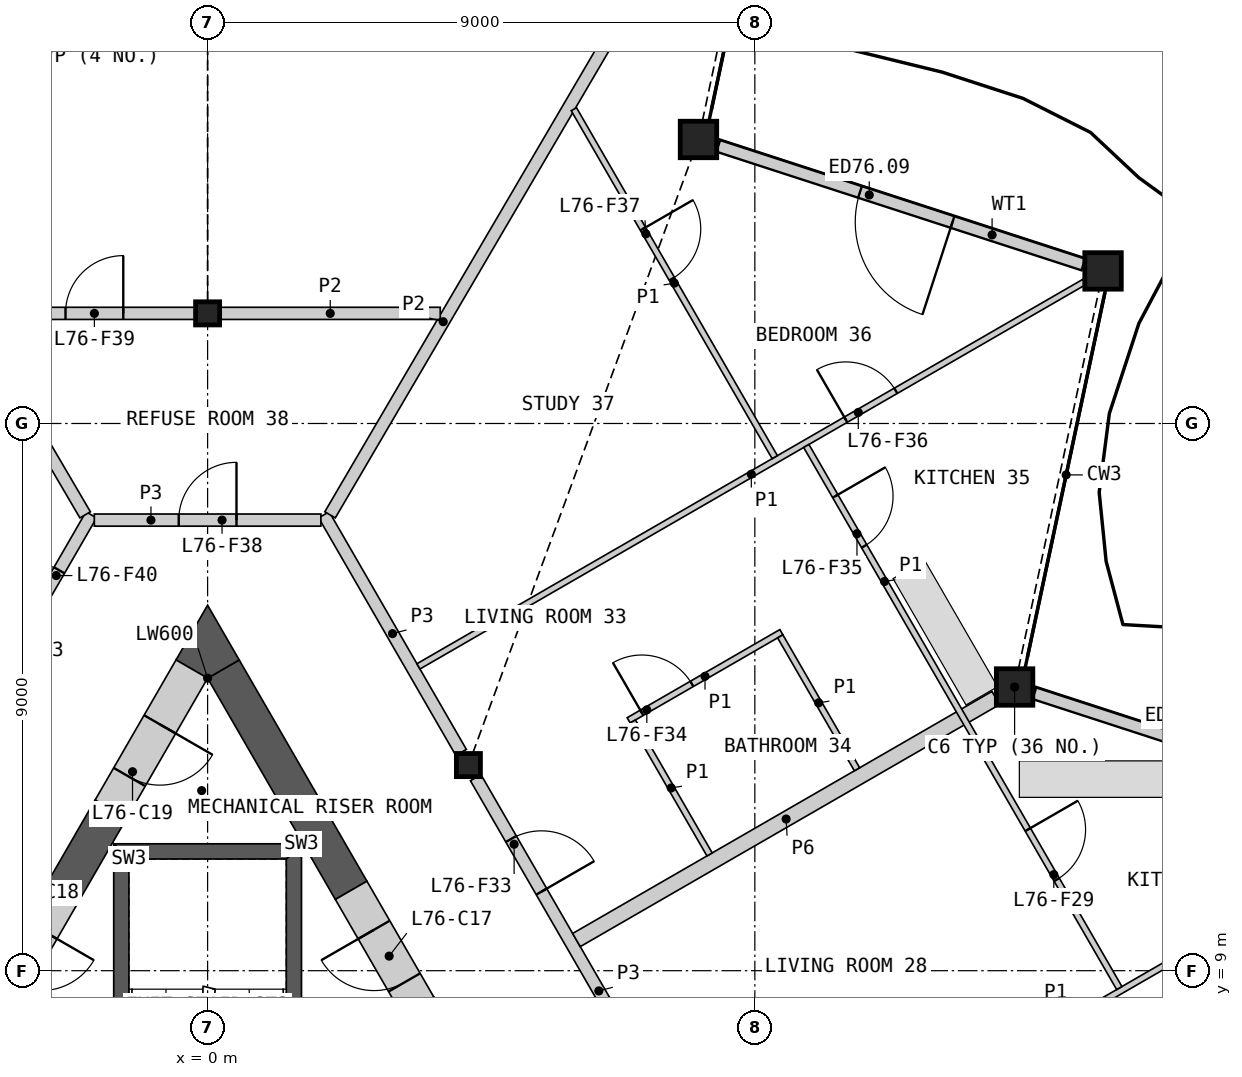
"""IFC4 building model, lengths in metres.
Left out: names, types, materials, properties, quantities, classifications, styles, units other than length and angle.
Written with IfcOpenShell. Run it as: python <this file> out.ifc"""

import sys

from ifc_helpers import new_model, si_unit, direction, frame, frame_2d, origin, origin_2d, place, context, subcontext, project, spatial, polyline, rectangle, hollow_rectangle, i_section, outline, extrude, element, fill, save


model = new_model("IFC4")
c1 = context("Model", 3, precision=1e-05, world=origin(), true_north=direction((0.0, 1.0)))
c2 = subcontext(c1, "Body", "Model", "MODEL_VIEW")
j1 = project(units=[si_unit("LENGTHUNIT", "METRE"), si_unit("PLANEANGLEUNIT", "RADIAN")], contexts=[c1])
p1 = place(None, origin())
s1 = spatial("IfcSite", under=j1, at=p1, CompositionType="ELEMENT")
p2 = place(p1, origin())
s2 = spatial("IfcBuilding", under=s1, at=p2, CompositionType="ELEMENT")
p3 = place(p2, frame((0.0, 0.0, 339.2)))
s3 = spatial("IfcBuildingStorey", under=s2, at=p3, CompositionType="ELEMENT", Elevation=339.2)
for number, where, z_axis, x_axis in (
    (1, (13.272, 13.666, 0.0), (0.0, 0.0, 1.0), (1.0, 0.0, 0.0)),
    (2, (14.727, 20.509, 0.0), (0.0, 0.0, 1.0), (1.0, 0.0, 0.0)),
    (3, (8.073, 22.671, 0.0), (0.0, 0.0, 1.0), (1.0, 0.0, 0.0)),
):
    element("IfcColumn", number, at=place(p3, frame(where, z_axis=z_axis, x_axis=x_axis)), inside=s3, PredefinedType="COLUMN", context=c2, shape_type="SweptSolid", body=[
        extrude(hollow_rectangle(XDim=0.6, YDim=0.6, WallThickness=0.04, at=origin_2d()), origin(), (0.0, 0.0, 1.0), 3.4),
    ])
for number, where, z_axis, x_axis in (
    (4, (0.0, 19.811, 0.0), (0.0, 0.0, 1.0), (1.0, 0.0, 0.0)),
    (5, (4.289, 12.382, 0.0), (0.0, 0.0, 1.0), (1.0, 0.0, 0.0)),
):
    element("IfcColumn", number, at=place(p3, frame(where, z_axis=z_axis, x_axis=x_axis)), inside=s3, PredefinedType="COLUMN", context=c2, shape_type="SweptSolid", body=[
        extrude(i_section(OverallWidth=0.396, OverallDepth=0.381, WebThickness=0.019, FlangeThickness=0.03, at=origin_2d()), origin(), (0.0, 0.0, 1.0), 3.4),
    ])
p4 = place(p3, frame((19.601, 11.612, 0.0), z_axis=(0.0, 0.0, 1.0), x_axis=(-0.951065041052, 0.308990756638, 0.0)))
e6 = element("IfcWall", 6, at=p4, inside=s3, PredefinedType="SOLIDWALL", context=c2, shape_type="SweptSolid", body=[
    extrude(rectangle(XDim=6.313, YDim=0.2, at=frame_2d((3.156, 0.0))), origin(), (0.0, 0.0, 1.0), 2.488),
])
p5 = place(p4, frame((2.263, 0.0, 0.0)))
e7 = element("IfcOpeningElement", 7, at=p5, cuts=e6, PredefinedType="OPENING", context=c2, shape_type="SweptSolid", body=[
    extrude(rectangle(XDim=1.6, YDim=2.25, at=frame_2d((0.8, 1.125))), frame((0.0, 0.11, 0.0), z_axis=(0.0, -1.0, 0.0), x_axis=(1.0, 0.0, 0.0)), (0.0, 0.0, 1.0), 0.22),
])
p6 = place(p3, frame((14.403, 20.614, 0.0), z_axis=(0.0, 0.0, 1.0), x_axis=(-0.951053103012, 0.309027499182, 0.0)))
e8 = element("IfcWall", 8, at=p6, inside=s3, PredefinedType="SOLIDWALL", context=c2, shape_type="SweptSolid", body=[
    extrude(rectangle(XDim=6.315, YDim=0.2, at=frame_2d((3.157, 0.0))), origin(), (0.0, 0.0, 1.0), 2.488),
])
p7 = place(p6, frame((2.263, 0.0, 0.0)))
e9 = element("IfcOpeningElement", 9, at=p7, cuts=e8, PredefinedType="OPENING", context=c2, shape_type="SweptSolid", body=[
    extrude(rectangle(XDim=1.6, YDim=2.25, at=frame_2d((0.8, 1.125))), frame((0.0, 0.11, 0.0), z_axis=(0.0, -1.0, 0.0), x_axis=(1.0, 0.0, 0.0)), (0.0, 0.0, 1.0), 0.22),
])
p8 = place(p3, origin())
e10 = element("IfcWall", 10, at=p8, inside=s3, PredefinedType="SHEAR", context=c2, shape_type="SweptSolid", body=[
    extrude(outline(polyline([(1.544, 5.237), (1.544, 11.087), (1.294, 10.837), (1.294, 5.237), (1.544, 5.237)])), origin(), (0.0, 0.0, 1.0), 3.1),
])
p9 = place(p3, origin())
e11 = element("IfcWall", 11, at=p9, inside=s3, PredefinedType="SHEAR", context=c2, shape_type="SweptSolid", body=[
    extrude(outline(polyline([(1.544, 11.087), (-1.544, 11.087), (-1.294, 10.837), (1.294, 10.837), (1.544, 11.087)])), origin(), (0.0, 0.0, 1.0), 3.1),
])
p10 = place(p3, origin())
e12 = element("IfcWall", 12, at=p10, inside=s3, PredefinedType="SHEAR", context=c2, shape_type="SweptSolid", body=[
    extrude(outline(polyline([(-1.294, 10.837), (-1.544, 11.087), (-1.544, 5.237), (-1.294, 5.237), (-1.294, 10.837)])), origin(), (0.0, 0.0, 1.0), 3.1),
])
p11 = place(p3, frame((8.686, -0.634, 0.0), z_axis=(0.0, 0.0, 1.0), x_axis=(-0.50001836461, 0.866014800712, 0.0)))
e13 = element("IfcWall", 13, at=p11, inside=s3, PredefinedType="SHEAR", context=c2, shape_type="SweptSolid", body=[
    extrude(rectangle(XDim=10.451, YDim=0.6, at=frame_2d((5.225, 0.0))), origin(), (0.0, 0.0, 1.0), 3.1),
])
p12 = place(p3, frame((2.361, 10.322, 0.0), z_axis=(0.0, 0.0, 1.0), x_axis=(-0.500000735859, 0.866024978935, 0.0)))
e14 = element("IfcWall", 14, at=p12, inside=s3, PredefinedType="SHEAR", context=c2, shape_type="SweptSolid", body=[
    extrude(rectangle(XDim=4.202, YDim=0.6, at=frame_2d((2.101, 0.0))), origin(), (0.0, 0.0, 1.0), 3.1),
])
p13 = place(p3, frame((-1.59, 11.658, 0.0), z_axis=(0.0, 0.0, 1.0), x_axis=(-0.500037594623, -0.866003697431, 0.0)))
e15 = element("IfcWall", 15, at=p13, inside=s3, PredefinedType="SHEAR", context=c2, shape_type="SweptSolid", body=[
    extrude(rectangle(XDim=1.542, YDim=0.6, at=frame_2d((0.771, 0.0))), origin(), (0.0, 0.0, 1.0), 3.1),
])
p14 = place(p3, origin())
e16 = element("IfcWall", 16, at=p14, inside=s3, PredefinedType="SHEAR", context=c2, shape_type="SweptSolid", body=[
    extrude(outline(polyline([(0.0, 13.811), (-0.52, 14.111), (0.0, 15.011), (0.52, 14.111), (0.0, 13.811)])), origin(), (0.0, 0.0, 1.0), 3.1),
])
p15 = place(p3, frame((3.461, 8.417, 0.0), z_axis=(0.0, 0.0, 1.0), x_axis=(-0.499946605688, 0.86605622881, 0.0)))
e17 = element("IfcWall", 17, at=p15, inside=s3, PredefinedType="SHEAR", context=c2, shape_type="SweptSolid", body=[
    extrude(rectangle(XDim=2.2, YDim=0.6, at=frame_2d((1.1, 0.0))), origin(), (0.0, 0.0, 1.0), 3.1),
])
p16 = place(p15, frame((0.45, 0.0, 0.0)))
e18 = element("IfcOpeningElement", 18, at=p16, cuts=e17, PredefinedType="OPENING", context=c2, shape_type="SweptSolid", body=[
    extrude(rectangle(XDim=1.0, YDim=2.1, at=frame_2d((0.5, 1.05))), frame((0.0, 0.31, 0.0), z_axis=(0.0, -1.0, 0.0), x_axis=(1.0, 0.0, 0.0)), (0.0, 0.0, 1.0), 0.62),
])
p17 = place(p3, frame((-2.361, 10.322, 0.0), z_axis=(0.0, 0.0, 1.0), x_axis=(-0.499946605688, -0.86605622881, 0.0)))
e19 = element("IfcWall", 19, at=p17, inside=s3, PredefinedType="SHEAR", context=c2, shape_type="SweptSolid", body=[
    extrude(rectangle(XDim=2.2, YDim=0.6, at=frame_2d((1.1, 0.0))), origin(), (0.0, 0.0, 1.0), 3.1),
])
p18 = place(p17, frame((0.75, 0.0, 0.0)))
e20 = element("IfcOpeningElement", 20, at=p18, cuts=e19, PredefinedType="OPENING", context=c2, shape_type="SweptSolid", body=[
    extrude(rectangle(XDim=1.0, YDim=2.1, at=frame_2d((0.5, 1.05))), frame((0.0, 0.31, 0.0), z_axis=(0.0, -1.0, 0.0), x_axis=(1.0, 0.0, 0.0)), (0.0, 0.0, 1.0), 0.62),
])
p19 = place(p3, frame((-0.26, 13.961, 0.0), z_axis=(0.0, 0.0, 1.0), x_axis=(-0.49997936161, -0.866037319036, 0.0)))
e21 = element("IfcWall", 21, at=p19, inside=s3, PredefinedType="SHEAR", context=c2, shape_type="SweptSolid", body=[
    extrude(rectangle(XDim=2.66, YDim=0.6, at=frame_2d((1.33, 0.0))), origin(), (0.0, 0.0, 1.0), 3.1),
])
p20 = place(p19, frame((1.05, 0.0, 0.0)))
e22 = element("IfcOpeningElement", 22, at=p20, cuts=e21, PredefinedType="OPENING", context=c2, shape_type="SweptSolid", body=[
    extrude(rectangle(XDim=1.0, YDim=2.1, at=frame_2d((0.5, 1.05))), frame((0.0, 0.31, 0.0), z_axis=(0.0, -1.0, 0.0), x_axis=(1.0, 0.0, 0.0)), (0.0, 0.0, 1.0), 0.62),
])
p21 = place(p3, frame((4.409, 12.174, 0.0), z_axis=(0.0, 0.0, 1.0), x_axis=(0.499984266882, -0.866034487114, 0.0)))
e23 = element("IfcWall", 23, at=p21, inside=s3, PredefinedType="PARTITIONING", context=c2, shape_type="SweptSolid", body=[
    extrude(rectangle(XDim=8.099, YDim=0.2, at=frame_2d((4.049, 0.0))), origin(), (0.0, 0.0, 1.0), 3.1),
])
p22 = place(p21, frame((5.123, 0.0, 0.0)))
e24 = element("IfcOpeningElement", 24, at=p22, cuts=e23, PredefinedType="OPENING", context=c2, shape_type="SweptSolid", body=[
    extrude(rectangle(XDim=1.0, YDim=2.1, at=frame_2d((0.5, 1.05))), frame((0.0, 0.11, 0.0), z_axis=(0.0, -1.0, 0.0), x_axis=(1.0, 0.0, 0.0)), (0.0, 0.0, 1.0), 0.22),
])
p23 = place(p21, frame((1.164, 0.0, 0.0)))
e25 = element("IfcOpeningElement", 25, at=p23, cuts=e23, PredefinedType="OPENING", context=c2, shape_type="SweptSolid", body=[
    extrude(rectangle(XDim=1.0, YDim=2.1, at=frame_2d((0.5, 1.05))), frame((0.0, 0.11, 0.0), z_axis=(0.0, -1.0, 0.0), x_axis=(1.0, 0.0, 0.0)), (0.0, 0.0, 1.0), 0.22),
])
p24 = place(p3, frame((6.066, 9.504, 0.0), z_axis=(0.0, 0.0, 1.0), x_axis=(0.866021168401, 0.500007335828, 0.0)))
e26 = element("IfcWall", 26, at=p24, inside=s3, PredefinedType="PARTITIONING", context=c2, shape_type="SweptSolid", body=[
    extrude(rectangle(XDim=7.962, YDim=0.25, at=frame_2d((3.981, 0.0))), origin(), (0.0, 0.0, 1.0), 2.33),
])
p25 = place(p3, frame((-4.169, 12.59, 0.0), z_axis=(0.0, 0.0, 1.0), x_axis=(0.499950370306, 0.866054055606, 0.0)))
e27 = element("IfcWall", 27, at=p25, inside=s3, PredefinedType="PARTITIONING", context=c2, shape_type="SweptSolid", body=[
    extrude(rectangle(XDim=4.513, YDim=0.2, at=frame_2d((2.256, 0.0))), origin(), (0.0, 0.0, 1.0), 3.1),
])
p26 = place(p25, frame((2.459, 0.0, 0.0)))
e28 = element("IfcOpeningElement", 28, at=p26, cuts=e27, PredefinedType="OPENING", context=c2, shape_type="SweptSolid", body=[
    extrude(rectangle(XDim=1.0, YDim=2.1, at=frame_2d((0.5, 1.05))), frame((0.0, 0.11, 0.0), z_axis=(0.0, -1.0, 0.0), x_axis=(1.0, 0.0, 0.0)), (0.0, 0.0, 1.0), 0.22),
])
p27 = place(p3, frame((1.913, 16.498, 0.0), z_axis=(0.0, 0.0, 1.0), x_axis=(0.499950370306, -0.866054055606, 0.0)))
e29 = element("IfcWall", 29, at=p27, inside=s3, PredefinedType="PARTITIONING", context=c2, shape_type="SweptSolid", body=[
    extrude(rectangle(XDim=4.513, YDim=0.2, at=frame_2d((2.256, 0.0))), origin(), (0.0, 0.0, 1.0), 3.1),
])
p28 = place(p3, frame((-1.863, 16.411, 0.0), z_axis=(0.0, 0.0, 1.0), x_axis=(1.0, 0.0, 0.0)))
e30 = element("IfcWall", 30, at=p28, inside=s3, PredefinedType="PARTITIONING", context=c2, shape_type="SweptSolid", body=[
    extrude(rectangle(XDim=3.726, YDim=0.2, at=frame_2d((1.863, 0.0))), origin(), (0.0, 0.0, 1.0), 3.1),
])
p29 = place(p28, frame((1.388, 0.0, 0.0)))
e31 = element("IfcOpeningElement", 31, at=p29, cuts=e30, PredefinedType="OPENING", context=c2, shape_type="SweptSolid", body=[
    extrude(rectangle(XDim=0.95, YDim=2.1, at=frame_2d((0.475, 1.05))), frame((0.0, 0.11, 0.0), z_axis=(0.0, -1.0, 0.0), x_axis=(1.0, 0.0, 0.0)), (0.0, 0.0, 1.0), 0.22),
])
p30 = place(p3, frame((-9.292, 28.919, 0.0), z_axis=(0.0, 0.0, 1.0), x_axis=(0.505558038556, -0.862792599442, 0.0)))
e32 = element("IfcWall", 32, at=p30, inside=s3, PredefinedType="PARTITIONING", context=c2, shape_type="SweptSolid", body=[
    extrude(rectangle(XDim=14.397, YDim=0.2, at=frame_2d((7.199, 0.0))), origin(), (0.0, 0.0, 1.0), 2.33),
])
p31 = place(p3, frame((2.014, 16.497, 0.0), z_axis=(0.0, 0.0, 1.0), x_axis=(0.5055676136, 0.862786988821, 0.0)))
e33 = element("IfcWall", 33, at=p31, inside=s3, PredefinedType="PARTITIONING", context=c2, shape_type="SweptSolid", body=[
    extrude(rectangle(XDim=14.728, YDim=0.2, at=frame_2d((7.364, 0.0))), origin(), (0.0, 0.0, 1.0), 2.33),
])
p32 = place(p3, frame((-3.826, 19.811, 0.0), z_axis=(0.0, 0.0, 1.0), x_axis=(1.0, 0.0, 0.0)))
e34 = element("IfcWall", 34, at=p32, inside=s3, PredefinedType="PARTITIONING", context=c2, shape_type="SweptSolid", body=[
    extrude(rectangle(XDim=3.618, YDim=0.2, at=frame_2d((1.809, 0.0))), origin(), (0.0, 0.0, 1.0), 2.33),
])
p33 = place(p32, frame((1.489, 0.0, 0.0)))
e35 = element("IfcOpeningElement", 35, at=p33, cuts=e34, PredefinedType="OPENING", context=c2, shape_type="SweptSolid", body=[
    extrude(rectangle(XDim=0.95, YDim=2.1, at=frame_2d((0.475, 1.05))), frame((0.0, 0.11, 0.0), z_axis=(0.0, -1.0, 0.0), x_axis=(1.0, 0.0, 0.0)), (0.0, 0.0, 1.0), 0.22),
])
p34 = place(p3, frame((0.208, 19.811, 0.0), z_axis=(0.0, 0.0, 1.0), x_axis=(1.0, 0.0, 0.0)))
e36 = element("IfcWall", 36, at=p34, inside=s3, PredefinedType="PARTITIONING", context=c2, shape_type="SweptSolid", body=[
    extrude(rectangle(XDim=3.618, YDim=0.2, at=frame_2d((1.809, 0.0))), origin(), (0.0, 0.0, 1.0), 2.33),
])
p35 = place(p3, frame((3.468, 14.005, 0.0), z_axis=(0.0, 0.0, 1.0), x_axis=(0.866020616849, 0.500008291124, 0.0)))
e37 = element("IfcWall", 37, at=p35, inside=s3, PredefinedType="PARTITIONING", context=c2, shape_type="SweptSolid", body=[
    extrude(rectangle(XDim=12.643, YDim=0.1, at=frame_2d((6.321, 0.0))), origin(), (0.0, 0.0, 1.0), 2.33),
])
p36 = place(p35, frame((8.115, 0.0, 0.0)))
e38 = element("IfcOpeningElement", 38, at=p36, cuts=e37, PredefinedType="OPENING", context=c2, shape_type="SweptSolid", body=[
    extrude(rectangle(XDim=0.95, YDim=2.1, at=frame_2d((0.475, 1.05))), frame((0.0, 0.06, 0.0), z_axis=(0.0, -1.0, 0.0), x_axis=(1.0, 0.0, 0.0)), (0.0, 0.0, 1.0), 0.12),
])
p37 = place(p3, frame((8.786, 5.073, 0.0), z_axis=(0.0, 0.0, 1.0), x_axis=(0.86602139559, 0.500006942333, 0.0)))
e39 = element("IfcWall", 39, at=p37, inside=s3, PredefinedType="PARTITIONING", context=c2, shape_type="SweptSolid", body=[
    extrude(rectangle(XDim=12.505, YDim=0.1, at=frame_2d((6.252, 0.0))), origin(), (0.0, 0.0, 1.0), 2.33),
])
p38 = place(p37, frame((4.772, 0.0, 0.0)))
e40 = element("IfcOpeningElement", 40, at=p38, cuts=e39, PredefinedType="OPENING", context=c2, shape_type="SweptSolid", body=[
    extrude(rectangle(XDim=0.95, YDim=2.1, at=frame_2d((0.475, 1.05))), frame((0.0, 0.06, 0.0), z_axis=(0.0, -1.0, 0.0), x_axis=(1.0, 0.0, 0.0)), (0.0, 0.0, 1.0), 0.12),
])
p39 = place(p3, frame((9.846, 17.63, 0.0), z_axis=(0.0, 0.0, 1.0), x_axis=(0.500013259472, -0.866017748289, 0.0)))
e41 = element("IfcWall", 41, at=p39, inside=s3, PredefinedType="PARTITIONING", context=c2, shape_type="SweptSolid", body=[
    extrude(rectangle(XDim=10.295, YDim=0.1, at=frame_2d((5.147, 0.0))), origin(), (0.0, 0.0, 1.0), 2.33),
])
p40 = place(p39, frame((7.286, 0.0, 0.0)))
e42 = element("IfcOpeningElement", 42, at=p40, cuts=e41, PredefinedType="OPENING", context=c2, shape_type="SweptSolid", body=[
    extrude(rectangle(XDim=0.95, YDim=2.1, at=frame_2d((0.475, 1.05))), frame((0.0, 0.06, 0.0), z_axis=(0.0, -1.0, 0.0), x_axis=(1.0, 0.0, 0.0)), (0.0, 0.0, 1.0), 0.12),
])
p41 = place(p39, frame((0.954, 0.0, 0.0)))
e43 = element("IfcOpeningElement", 43, at=p41, cuts=e41, PredefinedType="OPENING", context=c2, shape_type="SweptSolid", body=[
    extrude(rectangle(XDim=0.95, YDim=2.1, at=frame_2d((0.475, 1.05))), frame((0.0, 0.06, 0.0), z_axis=(0.0, -1.0, 0.0), x_axis=(1.0, 0.0, 0.0)), (0.0, 0.0, 1.0), 0.12),
])
p42 = place(p3, frame((6.024, 23.169, 0.0), z_axis=(0.0, 0.0, 1.0), x_axis=(0.499997497522, -0.866026848586, 0.0)))
e44 = element("IfcWall", 44, at=p42, inside=s3, PredefinedType="PARTITIONING", context=c2, shape_type="SweptSolid", body=[
    extrude(rectangle(XDim=6.608, YDim=0.1, at=frame_2d((3.304, 0.0))), origin(), (0.0, 0.0, 1.0), 2.33),
])
p43 = place(p42, frame((2.273, 0.0, 0.0)))
e45 = element("IfcOpeningElement", 45, at=p43, cuts=e44, PredefinedType="OPENING", context=c2, shape_type="SweptSolid", body=[
    extrude(rectangle(XDim=0.95, YDim=2.1, at=frame_2d((0.475, 1.05))), frame((0.0, 0.06, 0.0), z_axis=(0.0, -1.0, 0.0), x_axis=(1.0, 0.0, 0.0)), (0.0, 0.0, 1.0), 0.12),
])
p44 = place(p3, frame((6.925, 13.117, 0.0), z_axis=(0.0, 0.0, 1.0), x_axis=(0.866011727401, 0.500023687443, 0.0)))
e46 = element("IfcWall", 46, at=p44, inside=s3, PredefinedType="PARTITIONING", context=c2, shape_type="SweptSolid", body=[
    extrude(rectangle(XDim=2.9, YDim=0.1, at=frame_2d((1.45, 0.0))), origin(), (0.0, 0.0, 1.0), 2.33),
])
p45 = place(p44, frame((0.25, 0.0, 0.0)))
e47 = element("IfcOpeningElement", 47, at=p45, cuts=e46, PredefinedType="OPENING", context=c2, shape_type="SweptSolid", body=[
    extrude(rectangle(XDim=0.95, YDim=2.1, at=frame_2d((0.475, 1.05))), frame((0.0, 0.06, 0.0), z_axis=(0.0, -1.0, 0.0), x_axis=(1.0, 0.0, 0.0)), (0.0, 0.0, 1.0), 0.12),
])
p46 = place(p3, frame((9.418, 14.499, 0.0), z_axis=(0.0, 0.0, 1.0), x_axis=(0.500090717682, -0.865973021571, 0.0)))
e48 = element("IfcWall", 48, at=p46, inside=s3, PredefinedType="PARTITIONING", context=c2, shape_type="SweptSolid", body=[
    extrude(rectangle(XDim=2.525, YDim=0.1, at=frame_2d((1.262, 0.0))), origin(), (0.0, 0.0, 1.0), 2.33),
])
p47 = place(p3, frame((6.993, 13.099, 0.0), z_axis=(0.0, 0.0, 1.0), x_axis=(0.500048846702, -0.865997200291, 0.0)))
e49 = element("IfcWall", 49, at=p47, inside=s3, PredefinedType="PARTITIONING", context=c2, shape_type="SweptSolid", body=[
    extrude(rectangle(XDim=2.525, YDim=0.1, at=frame_2d((1.263, 0.0))), origin(), (0.0, 0.0, 1.0), 2.33),
])
p48 = place(p7, origin())
e50 = element("IfcDoor", 50, at=p48, inside=s3, OperationType="DOUBLE_DOOR_SINGLE_SWING", PredefinedType="DOOR", context=c2, shape_type="SweptSolid", body=[
    extrude(rectangle(XDim=1.6, YDim=2.25, at=frame_2d((0.8, 1.125))), frame((0.0, 0.025, 0.0), z_axis=(0.0, -1.0, 0.0), x_axis=(1.0, 0.0, 0.0)), (0.0, 0.0, 1.0), 0.05),
])
fill(e9, e50)
p49 = place(p16, origin())
e51 = element("IfcDoor", 51, at=p49, inside=s3, OperationType="SINGLE_SWING_RIGHT", PredefinedType="DOOR", context=c2, shape_type="SweptSolid", body=[
    extrude(rectangle(XDim=1.0, YDim=2.1, at=frame_2d((0.5, 1.05))), frame((0.0, 0.055, 0.0), z_axis=(0.0, -1.0, 0.0), x_axis=(1.0, 0.0, 0.0)), (0.0, 0.0, 1.0), 0.05),
])
fill(e18, e51)
p50 = place(p20, origin())
e52 = element("IfcDoor", 52, at=p50, inside=s3, OperationType="SINGLE_SWING_LEFT", PredefinedType="DOOR", context=c2, shape_type="SweptSolid", body=[
    extrude(rectangle(XDim=1.0, YDim=2.1, at=frame_2d((0.5, 1.05))), frame((0.0, 0.055, 0.0), z_axis=(0.0, -1.0, 0.0), x_axis=(1.0, 0.0, 0.0)), (0.0, 0.0, 1.0), 0.05),
])
fill(e22, e52)
p51 = place(p40, origin())
e53 = element("IfcDoor", 53, at=p51, inside=s3, OperationType="SINGLE_SWING_LEFT", PredefinedType="DOOR", context=c2, shape_type="SweptSolid", body=[
    extrude(rectangle(XDim=0.95, YDim=2.1, at=frame_2d((0.475, 1.05))), frame((0.0, 0.025, 0.0), z_axis=(0.0, -1.0, 0.0), x_axis=(1.0, 0.0, 0.0)), (0.0, 0.0, 1.0), 0.05),
])
fill(e42, e53)
p52 = place(p23, origin())
e54 = element("IfcDoor", 54, at=p52, inside=s3, OperationType="SINGLE_SWING_RIGHT", PredefinedType="DOOR", context=c2, shape_type="SweptSolid", body=[
    extrude(rectangle(XDim=1.0, YDim=2.1, at=frame_2d((0.5, 1.05))), frame((0.0, 0.025, 0.0), z_axis=(0.0, -1.0, 0.0), x_axis=(1.0, 0.0, 0.0)), (0.0, 0.0, 1.0), 0.05),
])
fill(e25, e54)
p53 = place(p45, origin())
e55 = element("IfcDoor", 55, at=p53, inside=s3, OperationType="SINGLE_SWING_LEFT", PredefinedType="DOOR", context=c2, shape_type="SweptSolid", body=[
    extrude(rectangle(XDim=0.95, YDim=2.1, at=frame_2d((0.475, 1.05))), frame((0.0, 0.025, 0.0), z_axis=(0.0, -1.0, 0.0), x_axis=(1.0, 0.0, 0.0)), (0.0, 0.0, 1.0), 0.05),
])
fill(e47, e55)
p54 = place(p41, origin())
e56 = element("IfcDoor", 56, at=p54, inside=s3, OperationType="SINGLE_SWING_LEFT", PredefinedType="DOOR", context=c2, shape_type="SweptSolid", body=[
    extrude(rectangle(XDim=0.95, YDim=2.1, at=frame_2d((0.475, 1.05))), frame((0.0, 0.025, 0.0), z_axis=(0.0, -1.0, 0.0), x_axis=(1.0, 0.0, 0.0)), (0.0, 0.0, 1.0), 0.05),
])
fill(e43, e56)
p55 = place(p36, origin())
e57 = element("IfcDoor", 57, at=p55, inside=s3, OperationType="SINGLE_SWING_LEFT", PredefinedType="DOOR", context=c2, shape_type="SweptSolid", body=[
    extrude(rectangle(XDim=0.95, YDim=2.1, at=frame_2d((0.475, 1.05))), frame((0.0, 0.025, 0.0), z_axis=(0.0, -1.0, 0.0), x_axis=(1.0, 0.0, 0.0)), (0.0, 0.0, 1.0), 0.05),
])
fill(e38, e57)
p56 = place(p43, origin())
e58 = element("IfcDoor", 58, at=p56, inside=s3, OperationType="SINGLE_SWING_LEFT", PredefinedType="DOOR", context=c2, shape_type="SweptSolid", body=[
    extrude(rectangle(XDim=0.95, YDim=2.1, at=frame_2d((0.475, 1.05))), frame((0.0, 0.025, 0.0), z_axis=(0.0, -1.0, 0.0), x_axis=(1.0, 0.0, 0.0)), (0.0, 0.0, 1.0), 0.05),
])
fill(e45, e58)
p57 = place(p29, origin())
e59 = element("IfcDoor", 59, at=p57, inside=s3, OperationType="SINGLE_SWING_RIGHT", PredefinedType="DOOR", context=c2, shape_type="SweptSolid", body=[
    extrude(rectangle(XDim=0.95, YDim=2.1, at=frame_2d((0.475, 1.05))), frame((0.0, 0.025, 0.0), z_axis=(0.0, -1.0, 0.0), x_axis=(1.0, 0.0, 0.0)), (0.0, 0.0, 1.0), 0.05),
])
fill(e31, e59)
p58 = place(p33, origin())
e60 = element("IfcDoor", 60, at=p58, inside=s3, OperationType="SINGLE_SWING_RIGHT", PredefinedType="DOOR", context=c2, shape_type="SweptSolid", body=[
    extrude(rectangle(XDim=0.95, YDim=2.1, at=frame_2d((0.475, 1.05))), frame((0.0, 0.025, 0.0), z_axis=(0.0, -1.0, 0.0), x_axis=(1.0, 0.0, 0.0)), (0.0, 0.0, 1.0), 0.05),
])
fill(e35, e60)
p59 = place(p26, origin())
e61 = element("IfcDoor", 61, at=p59, inside=s3, OperationType="SINGLE_SWING_LEFT", PredefinedType="DOOR", context=c2, shape_type="SweptSolid", body=[
    extrude(rectangle(XDim=1.0, YDim=2.1, at=frame_2d((0.5, 1.05))), frame((0.0, 0.025, 0.0), z_axis=(0.0, -1.0, 0.0), x_axis=(1.0, 0.0, 0.0)), (0.0, 0.0, 1.0), 0.05),
])
fill(e28, e61)
save(model, sys.argv[1])
